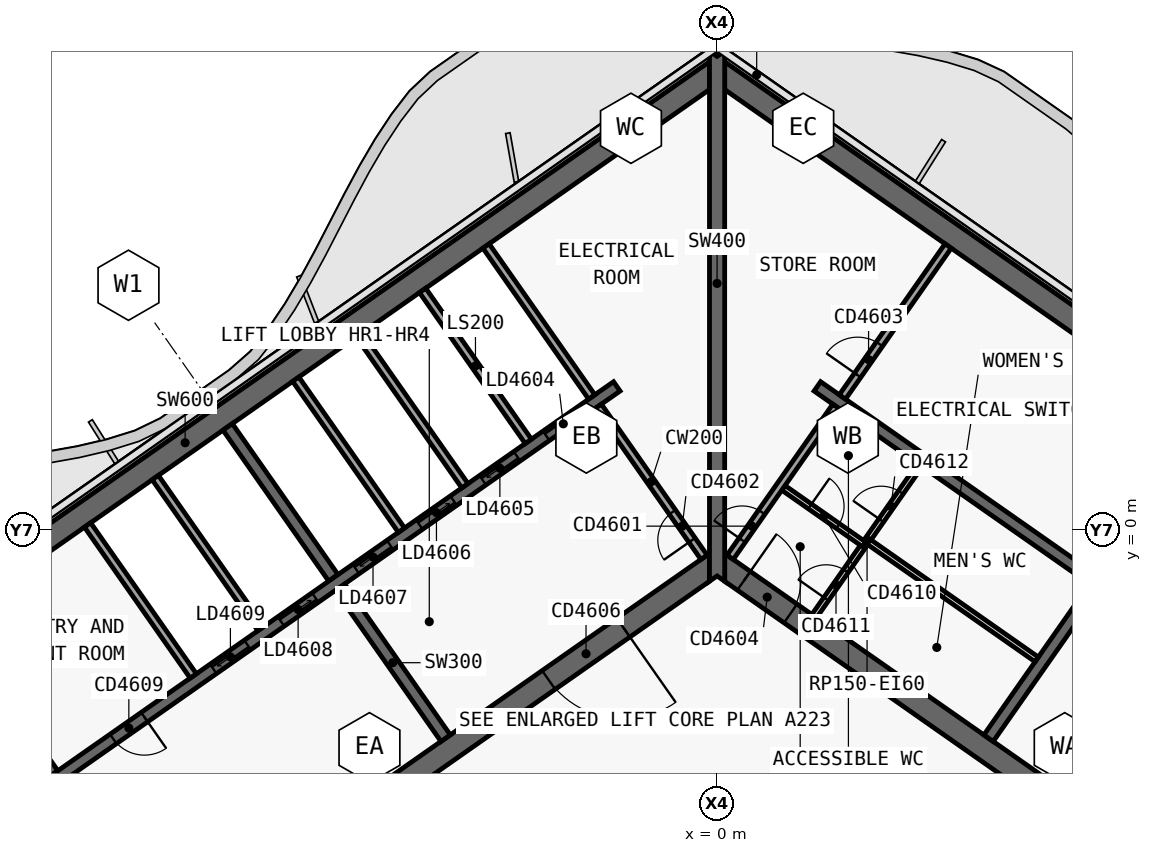
"""IFC4 building model, lengths in metres.
Left out: names, types, materials, properties, quantities, classifications, styles, units other than length and angle.
Written with IfcOpenShell. Run it as: python <this file> out.ifc"""

import sys

from ifc_helpers import new_model, si_unit, direction, frame, frame_2d, origin, place, context, subcontext, project, spatial, polyline, rectangle, outline, extrude, element, fill, save


model = new_model("IFC4")
c1 = context("Model", 3, precision=1e-05, world=origin(), true_north=direction((0.0, 1.0)))
c2 = subcontext(c1, "Body", "Model", "MODEL_VIEW")
j1 = project(units=[si_unit("LENGTHUNIT", "METRE"), si_unit("PLANEANGLEUNIT", "RADIAN")], contexts=[c1])
p1 = place(None, origin())
s1 = spatial("IfcSite", under=j1, at=p1, CompositionType="ELEMENT")
p2 = place(p1, origin())
s2 = spatial("IfcBuilding", under=s1, at=p2, CompositionType="ELEMENT")
p3 = place(p2, frame((0.0, 0.0, 252.7)))
s3 = spatial("IfcBuildingStorey", under=s2, at=p3, CompositionType="ELEMENT", Elevation=252.7)
p4 = place(p3, frame((-0.028, 12.066, 0.0), z_axis=(0.0, 0.0, 1.0), x_axis=(-0.819151382952, -0.573577380837, 0.0)))
e1 = element("IfcWall", 1, at=p4, inside=s3, PredefinedType="SHEAR", context=c2, shape_type="SweptSolid", body=[
    extrude(outline(polyline([(33.898, 0.3), (0.42, 0.3), (0.0, -0.3), (33.898, -0.3), (33.898, 0.3)])), origin(), (0.0, 0.0, 1.0), 3.9),
])
p5 = place(p3, frame((-0.028, -0.874, 0.0), z_axis=(0.0, 0.0, 1.0), x_axis=(-0.819150035022, -0.573579305871, 0.0)))
e2 = element("IfcWall", 2, at=p5, inside=s3, PredefinedType="SHEAR", context=c2, shape_type="SweptSolid", body=[
    extrude(outline(polyline([(26.476, 0.3), (0.42, 0.3), (0.0, -0.3), (26.476, -0.3), (26.476, 0.3)])), origin(), (0.0, 0.0, 1.0), 3.9),
])
p6 = place(p5, frame((2.976, 0.0, 0.0)))
e3 = element("IfcOpeningElement", 3, at=p6, cuts=e2, PredefinedType="OPENING", context=c2, shape_type="SweptSolid", body=[
    extrude(rectangle(XDim=2.4, YDim=2.1, at=frame_2d((1.2, 1.05))), frame((0.0, 0.31, 0.0), z_axis=(0.0, -1.0, 0.0), x_axis=(1.0, 0.0, 0.0)), (0.0, 0.0, 1.0), 0.62),
])
p7 = place(p5, frame((11.776, 0.0, 0.0)))
e4 = element("IfcOpeningElement", 4, at=p7, cuts=e2, PredefinedType="OPENING", context=c2, shape_type="SweptSolid", body=[
    extrude(rectangle(XDim=2.4, YDim=2.1, at=frame_2d((1.2, 1.05))), frame((0.0, 0.31, 0.0), z_axis=(0.0, -1.0, 0.0), x_axis=(1.0, 0.0, 0.0)), (0.0, 0.0, 1.0), 0.62),
])
p8 = place(p3, frame((-7.143, -5.49, 0.0), z_axis=(0.0, 0.0, 1.0), x_axis=(-0.573617744349, 0.819123118565, 0.0)))
e5 = element("IfcWall", 5, at=p8, inside=s3, PredefinedType="SHEAR", context=c2, shape_type="SweptSolid", body=[
    extrude(outline(polyline([(4.85, 0.15), (0.0, 0.15), (0.0, -0.15), (4.85, -0.15), (4.85, 0.15)])), origin(), (0.0, 0.0, 1.0), 3.9),
])
p9 = place(p3, frame((-10.097, -1.271, 0.0), z_axis=(0.0, 0.0, 1.0), x_axis=(-0.573560315113, 0.819163332265, 0.0)))
e6 = element("IfcWall", 6, at=p9, inside=s3, PredefinedType="SHEAR", context=c2, shape_type="SweptSolid", body=[
    extrude(outline(polyline([(4.85, -0.15), (4.85, 0.15), (0.0, 0.15), (0.0, -0.15), (4.85, -0.15)])), origin(), (0.0, 0.0, 1.0), 3.9),
])
p10 = place(p3, frame((-17.469, -6.433, 0.0), z_axis=(0.0, 0.0, 1.0), x_axis=(-0.573594092424, 0.81913968109, 0.0)))
e7 = element("IfcWall", 7, at=p10, inside=s3, PredefinedType="SHEAR", context=c2, shape_type="SweptSolid", body=[
    extrude(outline(polyline([(4.85, -0.15), (4.85, 0.15), (0.0, 0.15), (0.0, -0.15), (4.85, -0.15)])), origin(), (0.0, 0.0, 1.0), 3.9),
])
p11 = place(p3, frame((-2.638, 3.768, 0.0), z_axis=(0.0, 0.0, 1.0), x_axis=(-0.819155014212, -0.573572194837, 0.0)))
e8 = element("IfcWall", 8, at=p11, inside=s3, PredefinedType="SHEAR", context=c2, shape_type="SweptSolid", body=[
    extrude(outline(polyline([(26.4, 0.15), (0.0, 0.15), (0.0, -0.15), (26.4, -0.15), (26.4, 0.15)])), origin(), (0.0, 0.0, 1.0), 3.9),
])
p12 = place(p11, frame((1.169, 0.0, 0.0)))
e9 = element("IfcOpeningElement", 9, at=p12, cuts=e8, PredefinedType="OPENING", context=c2, shape_type="SweptSolid", body=[
    extrude(rectangle(XDim=1.1, YDim=2.1, at=frame_2d((0.55, 1.05))), frame((0.0, 0.16, 0.0), z_axis=(0.0, -1.0, 0.0), x_axis=(1.0, 0.0, 0.0)), (0.0, 0.0, 1.0), 0.32),
])
p13 = place(p11, frame((3.206, 0.0, 0.0)))
e10 = element("IfcOpeningElement", 10, at=p13, cuts=e8, PredefinedType="OPENING", context=c2, shape_type="SweptSolid", body=[
    extrude(rectangle(XDim=1.1, YDim=2.1, at=frame_2d((0.55, 1.05))), frame((0.0, 0.16, 0.0), z_axis=(0.0, -1.0, 0.0), x_axis=(1.0, 0.0, 0.0)), (0.0, 0.0, 1.0), 0.32),
])
p14 = place(p11, frame((5.244, 0.0, 0.0)))
e11 = element("IfcOpeningElement", 11, at=p14, cuts=e8, PredefinedType="OPENING", context=c2, shape_type="SweptSolid", body=[
    extrude(rectangle(XDim=1.1, YDim=2.1, at=frame_2d((0.55, 1.05))), frame((0.0, 0.16, 0.0), z_axis=(0.0, -1.0, 0.0), x_axis=(1.0, 0.0, 0.0)), (0.0, 0.0, 1.0), 0.32),
])
p15 = place(p11, frame((7.281, 0.0, 0.0)))
e12 = element("IfcOpeningElement", 12, at=p15, cuts=e8, PredefinedType="OPENING", context=c2, shape_type="SweptSolid", body=[
    extrude(rectangle(XDim=1.1, YDim=2.1, at=frame_2d((0.55, 1.05))), frame((0.0, 0.16, 0.0), z_axis=(0.0, -1.0, 0.0), x_axis=(1.0, 0.0, 0.0)), (0.0, 0.0, 1.0), 0.32),
])
p16 = place(p11, frame((9.688, 0.0, 0.0)))
e13 = element("IfcOpeningElement", 13, at=p16, cuts=e8, PredefinedType="OPENING", context=c2, shape_type="SweptSolid", body=[
    extrude(rectangle(XDim=1.1, YDim=2.1, at=frame_2d((0.55, 1.05))), frame((0.0, 0.16, 0.0), z_axis=(0.0, -1.0, 0.0), x_axis=(1.0, 0.0, 0.0)), (0.0, 0.0, 1.0), 0.32),
])
p17 = place(p11, frame((11.863, 0.0, 0.0)))
e14 = element("IfcOpeningElement", 14, at=p17, cuts=e8, PredefinedType="OPENING", context=c2, shape_type="SweptSolid", body=[
    extrude(rectangle(XDim=1.1, YDim=2.1, at=frame_2d((0.55, 1.05))), frame((0.0, 0.16, 0.0), z_axis=(0.0, -1.0, 0.0), x_axis=(1.0, 0.0, 0.0)), (0.0, 0.0, 1.0), 0.32),
])
p18 = place(p11, frame((15.175, 0.0, 0.0)))
e15 = element("IfcOpeningElement", 15, at=p18, cuts=e8, PredefinedType="OPENING", context=c2, shape_type="SweptSolid", body=[
    extrude(rectangle(XDim=1.0, YDim=2.1, at=frame_2d((0.5, 1.05))), frame((0.0, 0.16, 0.0), z_axis=(0.0, -1.0, 0.0), x_axis=(1.0, 0.0, 0.0)), (0.0, 0.0, 1.0), 0.32),
])
p19 = place(p3, frame((0.028, 12.066, 0.0), z_axis=(0.0, 0.0, 1.0), x_axis=(0.819151382952, -0.573577380837, 0.0)))
e16 = element("IfcWall", 16, at=p19, inside=s3, PredefinedType="SHEAR", context=c2, shape_type="SweptSolid", body=[
    extrude(outline(polyline([(33.898, 0.3), (0.0, 0.3), (0.42, -0.3), (33.898, -0.3), (33.898, 0.3)])), origin(), (0.0, 0.0, 1.0), 3.9),
])
p20 = place(p3, frame((0.028, -0.874, 0.0), z_axis=(0.0, 0.0, 1.0), x_axis=(0.819150035022, -0.573579305871, 0.0)))
e17 = element("IfcWall", 17, at=p20, inside=s3, PredefinedType="SHEAR", context=c2, shape_type="SweptSolid", body=[
    extrude(outline(polyline([(26.476, 0.3), (0.0, 0.3), (0.42, -0.3), (26.476, -0.3), (26.476, 0.3)])), origin(), (0.0, 0.0, 1.0), 3.9),
])
p21 = place(p20, frame((0.826, 0.0, 0.0)))
e18 = element("IfcOpeningElement", 18, at=p21, cuts=e17, PredefinedType="OPENING", context=c2, shape_type="SweptSolid", body=[
    extrude(rectangle(XDim=1.5, YDim=2.1, at=frame_2d((0.75, 1.05))), frame((0.0, 0.31, 0.0), z_axis=(0.0, -1.0, 0.0), x_axis=(1.0, 0.0, 0.0)), (0.0, 0.0, 1.0), 0.62),
])
p22 = place(p20, frame((12.226, 0.0, 0.0)))
e19 = element("IfcOpeningElement", 19, at=p22, cuts=e17, PredefinedType="OPENING", context=c2, shape_type="SweptSolid", body=[
    extrude(rectangle(XDim=1.5, YDim=2.1, at=frame_2d((0.75, 1.05))), frame((0.0, 0.31, 0.0), z_axis=(0.0, -1.0, 0.0), x_axis=(1.0, 0.0, 0.0)), (0.0, 0.0, 1.0), 0.62),
])
p23 = place(p3, frame((7.143, -5.49, 0.0), z_axis=(0.0, 0.0, 1.0), x_axis=(0.573617744349, 0.819123118565, 0.0)))
e20 = element("IfcWall", 20, at=p23, inside=s3, PredefinedType="SHEAR", context=c2, shape_type="SweptSolid", body=[
    extrude(outline(polyline([(0.0, 0.15), (0.0, -0.15), (4.85, -0.15), (4.85, 0.15), (0.0, 0.15)])), origin(), (0.0, 0.0, 1.0), 3.9),
])
p24 = place(p3, frame((2.638, 3.768, 0.0), z_axis=(0.0, 0.0, 1.0), x_axis=(0.819155014212, -0.573572194837, 0.0)))
e21 = element("IfcWall", 21, at=p24, inside=s3, PredefinedType="SHEAR", context=c2, shape_type="SweptSolid", body=[
    extrude(outline(polyline([(0.0, 0.15), (0.0, -0.15), (26.4, -0.15), (26.4, 0.15), (0.0, 0.15)])), origin(), (0.0, 0.0, 1.0), 3.9),
])
p25 = place(p24, frame((9.637, 0.0, 0.0)))
e22 = element("IfcOpeningElement", 22, at=p25, cuts=e21, PredefinedType="OPENING", context=c2, shape_type="SweptSolid", body=[
    extrude(rectangle(XDim=1.2, YDim=2.1, at=frame_2d((0.6, 1.05))), frame((0.0, 0.16, 0.0), z_axis=(0.0, -1.0, 0.0), x_axis=(1.0, 0.0, 0.0)), (0.0, 0.0, 1.0), 0.32),
])
p26 = place(p24, frame((11.812, 0.0, 0.0)))
e23 = element("IfcOpeningElement", 23, at=p26, cuts=e21, PredefinedType="OPENING", context=c2, shape_type="SweptSolid", body=[
    extrude(rectangle(XDim=1.2, YDim=2.1, at=frame_2d((0.6, 1.05))), frame((0.0, 0.16, 0.0), z_axis=(0.0, -1.0, 0.0), x_axis=(1.0, 0.0, 0.0)), (0.0, 0.0, 1.0), 0.32),
])
p27 = place(p24, frame((13.988, 0.0, 0.0)))
e24 = element("IfcOpeningElement", 24, at=p27, cuts=e21, PredefinedType="OPENING", context=c2, shape_type="SweptSolid", body=[
    extrude(rectangle(XDim=1.2, YDim=2.1, at=frame_2d((0.6, 1.05))), frame((0.0, 0.16, 0.0), z_axis=(0.0, -1.0, 0.0), x_axis=(1.0, 0.0, 0.0)), (0.0, 0.0, 1.0), 0.32),
])
p28 = place(p24, frame((16.262, 0.0, 0.0)))
e25 = element("IfcOpeningElement", 25, at=p28, cuts=e21, PredefinedType="OPENING", context=c2, shape_type="SweptSolid", body=[
    extrude(rectangle(XDim=1.0, YDim=2.1, at=frame_2d((0.5, 1.05))), frame((0.0, 0.16, 0.0), z_axis=(0.0, -1.0, 0.0), x_axis=(1.0, 0.0, 0.0)), (0.0, 0.0, 1.0), 0.32),
])
p29 = place(p3, frame((0.0, -1.361, 0.0), z_axis=(0.0, 0.0, 1.0), x_axis=(0.0, 1.0, 0.0)))
e26 = element("IfcWall", 26, at=p29, inside=s3, PredefinedType="SHEAR", context=c2, shape_type="SweptSolid", body=[
    extrude(outline(polyline([(0.14, 0.2), (0.0, 0.2), (0.14, 0.0), (0.0, -0.2), (0.14, -0.2), (1.012, -0.2), (12.94, -0.2), (13.813, -0.2), (13.893, -0.2), (13.933, -0.172), (13.813, 0.0), (13.933, 0.172), (13.893, 0.2), (13.813, 0.2), (12.94, 0.2), (1.012, 0.2), (0.14, 0.2)])), origin(), (0.0, 0.0, 1.0), 3.9),
])
p30 = place(p3, frame((-4.967, 2.321, 0.0), z_axis=(0.0, 0.0, 1.0), x_axis=(-0.573594092424, 0.81913968109, 0.0)))
e27 = element("IfcWall", 27, at=p30, inside=s3, PredefinedType="SOLIDWALL", context=c2, shape_type="SweptSolid", body=[
    extrude(rectangle(XDim=4.85, YDim=0.2, at=frame_2d((2.425, 0.0))), origin(), (0.0, 0.0, 1.0), 3.9),
])
p31 = place(p3, frame((-6.636, 1.152, 0.0), z_axis=(0.0, 0.0, 1.0), x_axis=(-0.573560315113, 0.819163332265, 0.0)))
e28 = element("IfcWall", 28, at=p31, inside=s3, PredefinedType="SOLIDWALL", context=c2, shape_type="SweptSolid", body=[
    extrude(rectangle(XDim=4.85, YDim=0.2, at=frame_2d((2.425, 0.0))), origin(), (0.0, 0.0, 1.0), 3.9),
])
p32 = place(p3, frame((-8.305, -0.017, 0.0), z_axis=(0.0, 0.0, 1.0), x_axis=(-0.573594092424, 0.81913968109, 0.0)))
e29 = element("IfcWall", 29, at=p32, inside=s3, PredefinedType="SOLIDWALL", context=c2, shape_type="SweptSolid", body=[
    extrude(rectangle(XDim=4.85, YDim=0.2, at=frame_2d((2.425, 0.0))), origin(), (0.0, 0.0, 1.0), 3.9),
])
p33 = place(p3, frame((-12.001, -2.605, 0.0), z_axis=(0.0, 0.0, 1.0), x_axis=(-0.573560315113, 0.819163332265, 0.0)))
e30 = element("IfcWall", 30, at=p33, inside=s3, PredefinedType="SOLIDWALL", context=c2, shape_type="SweptSolid", body=[
    extrude(rectangle(XDim=4.85, YDim=0.2, at=frame_2d((2.425, 0.0))), origin(), (0.0, 0.0, 1.0), 3.9),
])
p34 = place(p3, frame((-13.783, -3.852, 0.0), z_axis=(0.0, 0.0, 1.0), x_axis=(-0.573594092424, 0.81913968109, 0.0)))
e31 = element("IfcWall", 31, at=p34, inside=s3, PredefinedType="SOLIDWALL", context=c2, shape_type="SweptSolid", body=[
    extrude(rectangle(XDim=4.85, YDim=0.2, at=frame_2d((2.425, 0.0))), origin(), (0.0, 0.0, 1.0), 3.9),
])
p35 = place(p3, frame((2.556, -2.278, 0.0), z_axis=(0.0, 0.0, 1.0), x_axis=(0.573560315113, 0.819163332265, 0.0)))
e32 = element("IfcWall", 32, at=p35, inside=s3, PredefinedType="PARTITIONING", context=c2, shape_type="SweptSolid", body=[
    extrude(rectangle(XDim=4.85, YDim=0.15, at=frame_2d((2.425, 0.0))), origin(), (0.0, 0.0, 1.0), 3.62),
])
p36 = place(p35, frame((0.55, 0.0, 0.0)))
e33 = element("IfcOpeningElement", 33, at=p36, cuts=e32, PredefinedType="OPENING", context=c2, shape_type="SweptSolid", body=[
    extrude(rectangle(XDim=0.9, YDim=2.1, at=frame_2d((0.45, 1.05))), frame((0.0, 0.085, 0.0), z_axis=(0.0, -1.0, 0.0), x_axis=(1.0, 0.0, 0.0)), (0.0, 0.0, 1.0), 0.17),
])
p37 = place(p35, frame((3.075, 0.0, 0.0)))
e34 = element("IfcOpeningElement", 34, at=p37, cuts=e32, PredefinedType="OPENING", context=c2, shape_type="SweptSolid", body=[
    extrude(rectangle(XDim=0.9, YDim=2.1, at=frame_2d((0.45, 1.05))), frame((0.0, 0.085, 0.0), z_axis=(0.0, -1.0, 0.0), x_axis=(1.0, 0.0, 0.0)), (0.0, 0.0, 1.0), 0.17),
])
p38 = place(p3, frame((1.745, 1.097, 0.0), z_axis=(0.0, 0.0, 1.0), x_axis=(0.819178980414, -0.573537965655, 0.0)))
e35 = element("IfcWall", 35, at=p38, inside=s3, PredefinedType="PARTITIONING", context=c2, shape_type="SweptSolid", body=[
    extrude(rectangle(XDim=2.6, YDim=0.15, at=frame_2d((1.3, 0.0))), origin(), (0.0, 0.0, 1.0), 3.62),
])
p39 = place(p38, frame((0.85, 0.0, 0.0)))
e36 = element("IfcOpeningElement", 36, at=p39, cuts=e35, PredefinedType="OPENING", context=c2, shape_type="SweptSolid", body=[
    extrude(rectangle(XDim=0.9, YDim=2.1, at=frame_2d((0.45, 1.05))), frame((0.0, 0.085, 0.0), z_axis=(0.0, -1.0, 0.0), x_axis=(1.0, 0.0, 0.0)), (0.0, 0.0, 1.0), 0.17),
])
p40 = place(p3, frame((3.947, -0.292, 0.0), z_axis=(0.0, 0.0, 1.0), x_axis=(0.819151939971, -0.573576585332, 0.0)))
e37 = element("IfcWall", 37, at=p40, inside=s3, PredefinedType="PARTITIONING", context=c2, shape_type="SweptSolid", body=[
    extrude(rectangle(XDim=5.45, YDim=0.15, at=frame_2d((2.725, 0.0))), origin(), (0.0, 0.0, 1.0), 3.62),
])
p41 = place(p3, frame((-0.344, -0.729, 0.0), z_axis=(0.0, 0.0, 1.0), x_axis=(-0.573560315113, 0.819163332265, 0.0)))
e38 = element("IfcWall", 38, at=p41, inside=s3, PredefinedType="SOLIDWALL", context=c2, shape_type="SweptSolid", body=[
    extrude(rectangle(XDim=4.85, YDim=0.2, at=frame_2d((2.425, 0.0))), origin(), (0.0, 0.0, 1.0), 3.62),
])
p42 = place(p41, frame((0.55, 0.0, 0.0)))
e39 = element("IfcOpeningElement", 39, at=p42, cuts=e38, PredefinedType="OPENING", context=c2, shape_type="SweptSolid", body=[
    extrude(rectangle(XDim=0.9, YDim=2.1, at=frame_2d((0.45, 1.05))), frame((0.0, 0.11, 0.0), z_axis=(0.0, -1.0, 0.0), x_axis=(1.0, 0.0, 0.0)), (0.0, 0.0, 1.0), 0.22),
])
p43 = place(p3, frame((-3.298, 3.49, 0.0), z_axis=(0.0, 0.0, 1.0), x_axis=(-0.573560315113, 0.819163332265, 0.0)))
e40 = element("IfcWall", 40, at=p43, inside=s3, PredefinedType="SOLIDWALL", context=c2, shape_type="SweptSolid", body=[
    extrude(rectangle(XDim=4.85, YDim=0.2, at=frame_2d((2.425, 0.0))), origin(), (0.0, 0.0, 1.0), 3.62),
])
p44 = place(p3, frame((0.344, -0.729, 0.0), z_axis=(0.0, 0.0, 1.0), x_axis=(0.573560315113, 0.819163332265, 0.0)))
e41 = element("IfcWall", 41, at=p44, inside=s3, PredefinedType="SOLIDWALL", context=c2, shape_type="SweptSolid", body=[
    extrude(rectangle(XDim=4.85, YDim=0.2, at=frame_2d((2.425, 0.0))), origin(), (0.0, 0.0, 1.0), 3.62),
])
p45 = place(p44, frame((0.55, 0.0, 0.0)))
e42 = element("IfcOpeningElement", 42, at=p45, cuts=e41, PredefinedType="OPENING", context=c2, shape_type="SweptSolid", body=[
    extrude(rectangle(XDim=0.9, YDim=2.1, at=frame_2d((0.45, 1.05))), frame((0.0, 0.11, 0.0), z_axis=(0.0, -1.0, 0.0), x_axis=(1.0, 0.0, 0.0)), (0.0, 0.0, 1.0), 0.22),
])
p46 = place(p3, frame((3.298, 3.49, 0.0), z_axis=(0.0, 0.0, 1.0), x_axis=(0.573560315113, 0.819163332265, 0.0)))
e43 = element("IfcWall", 43, at=p46, inside=s3, PredefinedType="SOLIDWALL", context=c2, shape_type="SweptSolid", body=[
    extrude(rectangle(XDim=4.85, YDim=0.2, at=frame_2d((2.425, 0.0))), origin(), (0.0, 0.0, 1.0), 3.62),
])
p47 = place(p46, frame((0.7, 0.0, 0.0)))
e44 = element("IfcOpeningElement", 44, at=p47, cuts=e43, PredefinedType="OPENING", context=c2, shape_type="SweptSolid", body=[
    extrude(rectangle(XDim=1.0, YDim=2.1, at=frame_2d((0.5, 1.05))), frame((0.0, 0.11, 0.0), z_axis=(0.0, -1.0, 0.0), x_axis=(1.0, 0.0, 0.0)), (0.0, 0.0, 1.0), 0.22),
])
p48 = place(p12, origin())
e45 = element("IfcDoor", 45, at=p48, inside=s3, OperationType="SLIDING_TO_LEFT", PredefinedType="DOOR", context=c2, shape_type="SweptSolid", body=[
    extrude(rectangle(XDim=1.1, YDim=2.1, at=frame_2d((0.55, 1.05))), frame((0.0, 0.025, 0.0), z_axis=(0.0, -1.0, 0.0), x_axis=(1.0, 0.0, 0.0)), (0.0, 0.0, 1.0), 0.05),
])
fill(e9, e45)
p49 = place(p13, origin())
e46 = element("IfcDoor", 46, at=p49, inside=s3, OperationType="SLIDING_TO_RIGHT", PredefinedType="DOOR", context=c2, shape_type="SweptSolid", body=[
    extrude(rectangle(XDim=1.1, YDim=2.1, at=frame_2d((0.55, 1.05))), frame((0.0, 0.025, 0.0), z_axis=(0.0, -1.0, 0.0), x_axis=(1.0, 0.0, 0.0)), (0.0, 0.0, 1.0), 0.05),
])
fill(e10, e46)
p50 = place(p14, origin())
e47 = element("IfcDoor", 47, at=p50, inside=s3, OperationType="SLIDING_TO_LEFT", PredefinedType="DOOR", context=c2, shape_type="SweptSolid", body=[
    extrude(rectangle(XDim=1.1, YDim=2.1, at=frame_2d((0.55, 1.05))), frame((0.0, 0.025, 0.0), z_axis=(0.0, -1.0, 0.0), x_axis=(1.0, 0.0, 0.0)), (0.0, 0.0, 1.0), 0.05),
])
fill(e11, e47)
p51 = place(p15, origin())
e48 = element("IfcDoor", 48, at=p51, inside=s3, OperationType="SLIDING_TO_RIGHT", PredefinedType="DOOR", context=c2, shape_type="SweptSolid", body=[
    extrude(rectangle(XDim=1.1, YDim=2.1, at=frame_2d((0.55, 1.05))), frame((0.0, 0.025, 0.0), z_axis=(0.0, -1.0, 0.0), x_axis=(1.0, 0.0, 0.0)), (0.0, 0.0, 1.0), 0.05),
])
fill(e12, e48)
p52 = place(p16, origin())
e49 = element("IfcDoor", 49, at=p52, inside=s3, OperationType="SLIDING_TO_LEFT", PredefinedType="DOOR", context=c2, shape_type="SweptSolid", body=[
    extrude(rectangle(XDim=1.1, YDim=2.1, at=frame_2d((0.55, 1.05))), frame((0.0, 0.025, 0.0), z_axis=(0.0, -1.0, 0.0), x_axis=(1.0, 0.0, 0.0)), (0.0, 0.0, 1.0), 0.05),
])
fill(e13, e49)
p53 = place(p17, origin())
e50 = element("IfcDoor", 50, at=p53, inside=s3, OperationType="SLIDING_TO_RIGHT", PredefinedType="DOOR", context=c2, shape_type="SweptSolid", body=[
    extrude(rectangle(XDim=1.1, YDim=2.1, at=frame_2d((0.55, 1.05))), frame((0.0, 0.025, 0.0), z_axis=(0.0, -1.0, 0.0), x_axis=(1.0, 0.0, 0.0)), (0.0, 0.0, 1.0), 0.05),
])
fill(e14, e50)
p54 = place(p18, origin())
e51 = element("IfcDoor", 51, at=p54, inside=s3, OperationType="SINGLE_SWING_RIGHT", PredefinedType="DOOR", context=c2, shape_type="SweptSolid", body=[
    extrude(rectangle(XDim=1.0, YDim=2.1, at=frame_2d((0.5, 1.05))), frame((0.0, 0.025, 0.0), z_axis=(0.0, -1.0, 0.0), x_axis=(1.0, 0.0, 0.0)), (0.0, 0.0, 1.0), 0.05),
])
fill(e15, e51)
p55 = place(p6, origin())
e52 = element("IfcDoor", 52, at=p55, inside=s3, OperationType="DOUBLE_DOOR_SINGLE_SWING", PredefinedType="DOOR", context=c2, shape_type="SweptSolid", body=[
    extrude(rectangle(XDim=2.4, YDim=2.1, at=frame_2d((1.2, 1.05))), frame((0.0, 0.025, 0.0), z_axis=(0.0, -1.0, 0.0), x_axis=(1.0, 0.0, 0.0)), (0.0, 0.0, 1.0), 0.05),
])
fill(e3, e52)
p56 = place(p36, origin())
e53 = element("IfcDoor", 53, at=p56, inside=s3, OperationType="SINGLE_SWING_RIGHT", PredefinedType="DOOR", context=c2, shape_type="SweptSolid", body=[
    extrude(rectangle(XDim=0.9, YDim=2.1, at=frame_2d((0.45, 1.05))), frame((0.0, 0.025, 0.0), z_axis=(0.0, -1.0, 0.0), x_axis=(1.0, 0.0, 0.0)), (0.0, 0.0, 1.0), 0.05),
])
fill(e33, e53)
p57 = place(p39, origin())
e54 = element("IfcDoor", 54, at=p57, inside=s3, OperationType="SINGLE_SWING_RIGHT", PredefinedType="DOOR", context=c2, shape_type="SweptSolid", body=[
    extrude(rectangle(XDim=0.9, YDim=2.1, at=frame_2d((0.45, 1.05))), frame((0.0, 0.025, 0.0), z_axis=(0.0, -1.0, 0.0), x_axis=(1.0, 0.0, 0.0)), (0.0, 0.0, 1.0), 0.05),
])
fill(e36, e54)
p58 = place(p37, origin())
e55 = element("IfcDoor", 55, at=p58, inside=s3, OperationType="SINGLE_SWING_RIGHT", PredefinedType="DOOR", context=c2, shape_type="SweptSolid", body=[
    extrude(rectangle(XDim=0.9, YDim=2.1, at=frame_2d((0.45, 1.05))), frame((0.0, 0.025, 0.0), z_axis=(0.0, -1.0, 0.0), x_axis=(1.0, 0.0, 0.0)), (0.0, 0.0, 1.0), 0.05),
])
fill(e34, e55)
p59 = place(p21, origin())
e56 = element("IfcDoor", 56, at=p59, inside=s3, OperationType="SINGLE_SWING_RIGHT", PredefinedType="DOOR", context=c2, shape_type="SweptSolid", body=[
    extrude(rectangle(XDim=1.5, YDim=2.1, at=frame_2d((0.75, 1.05))), frame((0.0, 0.025, 0.0), z_axis=(0.0, -1.0, 0.0), x_axis=(1.0, 0.0, 0.0)), (0.0, 0.0, 1.0), 0.05),
])
fill(e18, e56)
p60 = place(p42, origin())
e57 = element("IfcDoor", 57, at=p60, inside=s3, OperationType="SINGLE_SWING_RIGHT", PredefinedType="DOOR", context=c2, shape_type="SweptSolid", body=[
    extrude(rectangle(XDim=0.9, YDim=2.1, at=frame_2d((0.45, 1.05))), frame((0.0, 0.025, 0.0), z_axis=(0.0, -1.0, 0.0), x_axis=(1.0, 0.0, 0.0)), (0.0, 0.0, 1.0), 0.05),
])
fill(e39, e57)
p61 = place(p45, origin())
e58 = element("IfcDoor", 58, at=p61, inside=s3, OperationType="SINGLE_SWING_RIGHT", PredefinedType="DOOR", context=c2, shape_type="SweptSolid", body=[
    extrude(rectangle(XDim=0.9, YDim=2.1, at=frame_2d((0.45, 1.05))), frame((0.0, 0.025, 0.0), z_axis=(0.0, -1.0, 0.0), x_axis=(1.0, 0.0, 0.0)), (0.0, 0.0, 1.0), 0.05),
])
fill(e42, e58)
p62 = place(p47, origin())
e59 = element("IfcDoor", 59, at=p62, inside=s3, OperationType="SINGLE_SWING_RIGHT", PredefinedType="DOOR", context=c2, shape_type="SweptSolid", body=[
    extrude(rectangle(XDim=1.0, YDim=2.1, at=frame_2d((0.5, 1.05))), frame((0.0, 0.025, 0.0), z_axis=(0.0, -1.0, 0.0), x_axis=(1.0, 0.0, 0.0)), (0.0, 0.0, 1.0), 0.05),
])
fill(e44, e59)
save(model, sys.argv[1])
